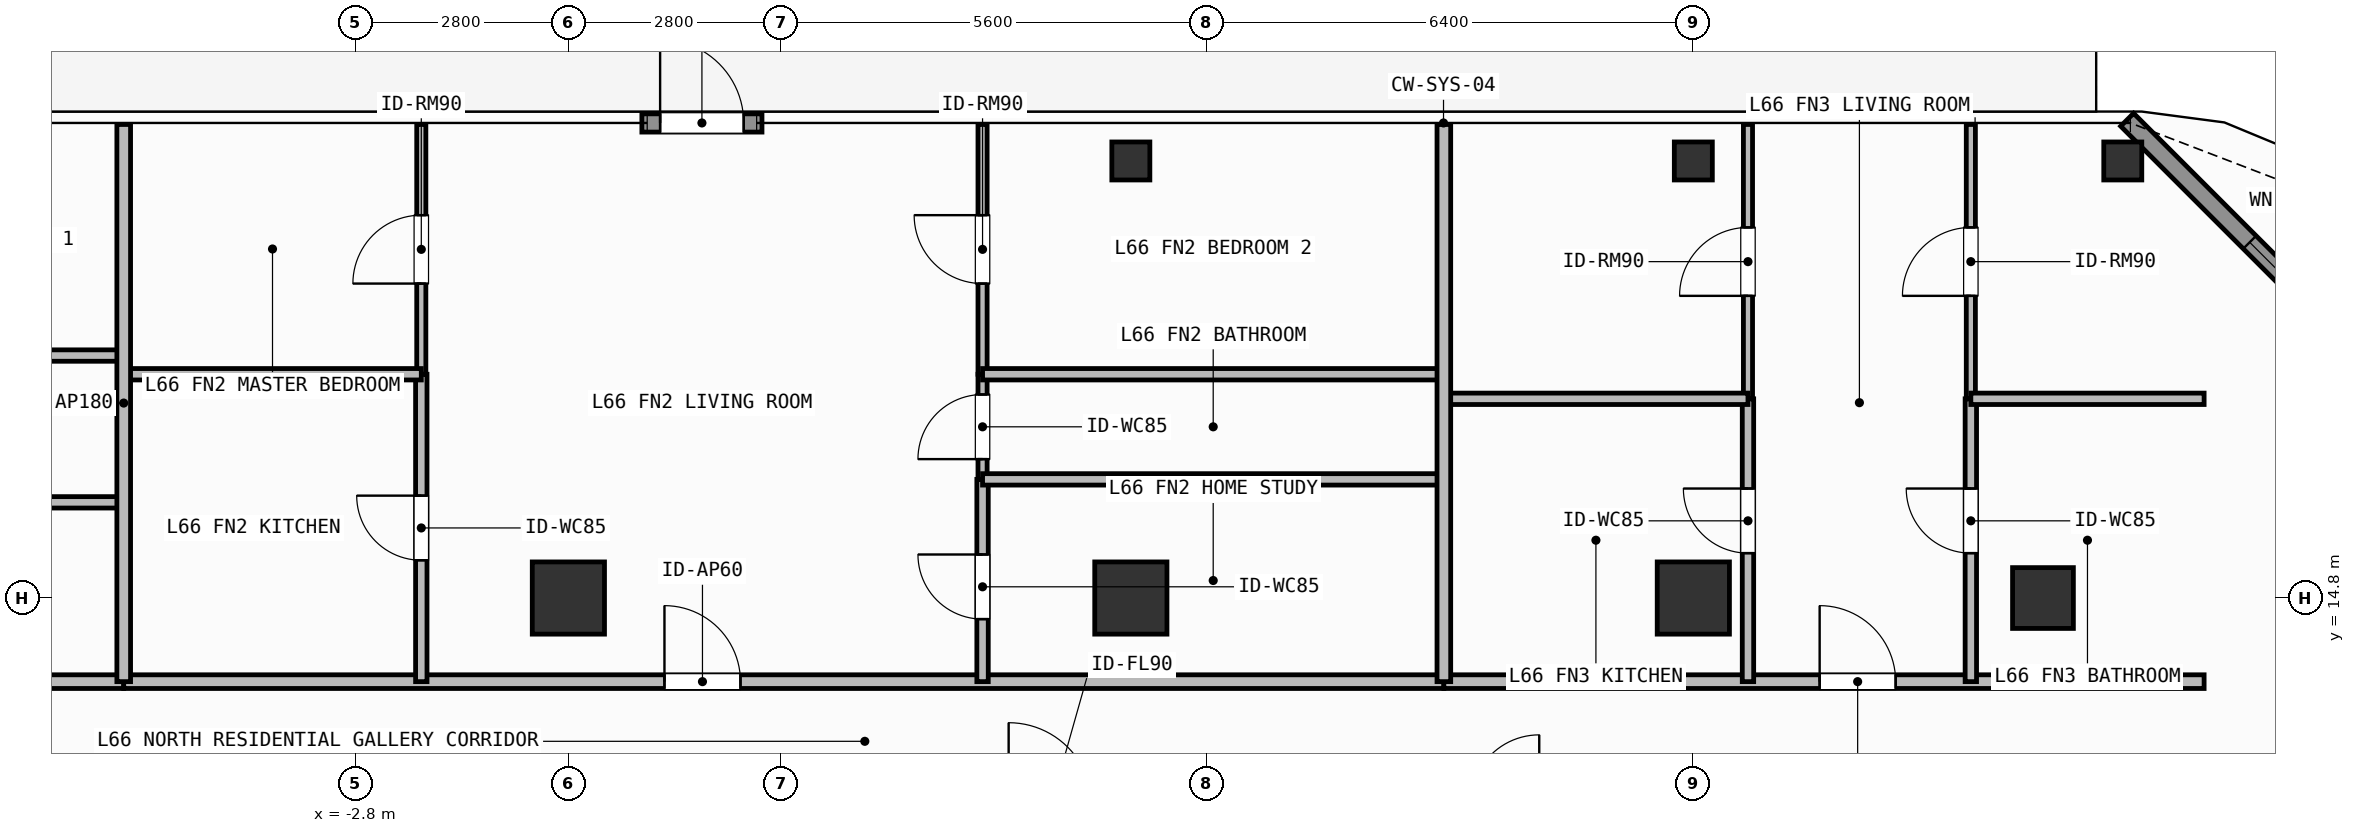
"""IFC4 building model, lengths in metres.
Left out: names, types, materials, properties, quantities, classifications, styles, units other than length and angle.
Written with IfcOpenShell. Run it as: python <this file> out.ifc"""

import sys

from ifc_helpers import new_model, si_unit, direction, frame, frame_2d, origin, origin_2d, place, context, subcontext, project, spatial, rectangle, hollow_rectangle, extrude, element, fill, save


model = new_model("IFC4")
c1 = context("Model", 3, precision=1e-05, world=origin(), true_north=direction((0.0, 1.0)))
c2 = subcontext(c1, "Body", "Model", "MODEL_VIEW")
j1 = project(units=[si_unit("LENGTHUNIT", "METRE"), si_unit("PLANEANGLEUNIT", "RADIAN")], contexts=[c1])
p1 = place(None, origin())
s1 = spatial("IfcSite", under=j1, at=p1, CompositionType="ELEMENT")
p2 = place(p1, origin())
s2 = spatial("IfcBuilding", under=s1, at=p2, CompositionType="ELEMENT")
p3 = place(p2, frame((0.0, 0.0, 270.3)))
s3 = spatial("IfcBuildingStorey", under=s2, at=p3, CompositionType="ELEMENT", Elevation=270.3)
for number, where, z_axis, x_axis in (
    (1, (0.0, 14.8, 0.0), (0.0, 0.0, 1.0), (1.0, 0.0, 0.0)),
    (2, (7.4, 14.8, 0.0), (0.0, 0.0, 1.0), (1.0, 0.0, 0.0)),
    (3, (14.8, 14.8, 0.0), (0.0, 0.0, 1.0), (1.0, 0.0, 0.0)),
):
    element("IfcColumn", number, at=place(p3, frame(where, z_axis=z_axis, x_axis=x_axis)), inside=s3, PredefinedType="COLUMN", context=c2, shape_type="SweptSolid", body=[
        extrude(rectangle(XDim=0.95, YDim=0.95, at=origin_2d()), origin(), (0.0, 0.0, 1.0), 3.9),
    ])
p4 = place(p3, frame((19.4, 14.8, 0.0), z_axis=(0.0, 0.0, 1.0), x_axis=(1.0, 0.0, 0.0)))
e4 = element("IfcColumn", 4, at=p4, inside=s3, PredefinedType="COLUMN", context=c2, shape_type="SweptSolid", body=[
    extrude(hollow_rectangle(XDim=0.8, YDim=0.8, WallThickness=0.036, at=origin_2d()), origin(), (0.0, 0.0, 1.0), 3.9),
])
for number, where, z_axis, x_axis in (
    (5, (20.45, 20.55, 0.0), (0.0, 0.0, 1.0), (1.0, 0.0, 0.0)),
    (6, (7.4, 20.55, 0.0), (0.0, 0.0, 1.0), (1.0, 0.0, 0.0)),
    (7, (14.8, 20.55, 0.0), (0.0, 0.0, 1.0), (1.0, 0.0, 0.0)),
):
    element("IfcColumn", number, at=place(p3, frame(where, z_axis=z_axis, x_axis=x_axis)), inside=s3, PredefinedType="COLUMN", context=c2, shape_type="SweptSolid", body=[
        extrude(hollow_rectangle(XDim=0.5, YDim=0.5, WallThickness=0.025, at=origin_2d()), origin(), (0.0, 0.0, 1.0), 3.9),
    ])
p5 = place(p3, frame((0.967, 21.05, 0.0), z_axis=(0.0, 0.0, 1.0), x_axis=(1.0, 0.0, 0.0)))
e8 = element("IfcWall", 8, at=p5, inside=s3, PredefinedType="SOLIDWALL", context=c2, shape_type="SweptSolid", body=[
    extrude(rectangle(XDim=1.58, YDim=0.24, at=frame_2d((0.79, 0.0))), origin(), (0.0, 0.0, 1.0), 3.68),
])
p6 = place(p5, frame((0.24, 0.0, 0.0)))
e9 = element("IfcOpeningElement", 9, at=p6, cuts=e8, PredefinedType="OPENING", context=c2, shape_type="SweptSolid", body=[
    extrude(rectangle(XDim=1.1, YDim=2.2, at=frame_2d((0.55, 1.1))), frame((0.0, 0.13, 0.0), z_axis=(0.0, -1.0, 0.0), x_axis=(1.0, 0.0, 0.0)), (0.0, 0.0, 1.0), 0.26),
])
p7 = place(p3, frame((20.508, 21.092, 0.0), z_axis=(0.0, 0.0, 1.0), x_axis=(0.707126925818, -0.707086635981, 0.0)))
e10 = element("IfcWall", 10, at=p7, inside=s3, PredefinedType="SOLIDWALL", context=c2, shape_type="SweptSolid", body=[
    extrude(rectangle(XDim=6.06, YDim=0.24, at=frame_2d((3.03, 0.0))), origin(), (0.0, 0.0, 1.0), 3.68),
])
p8 = place(p7, frame((2.28, 0.0, 0.8)))
e11 = element("IfcOpeningElement", 11, at=p8, cuts=e10, PredefinedType="OPENING", context=c2, shape_type="SweptSolid", body=[
    extrude(rectangle(XDim=1.5, YDim=1.85, at=frame_2d((0.75, 0.925))), frame((0.0, 0.13, 0.0), z_axis=(0.0, -1.0, 0.0), x_axis=(1.0, 0.0, 0.0)), (0.0, 0.0, 1.0), 0.26),
])
p9 = place(p3, frame((-13.72, 13.7, 0.0), z_axis=(0.0, 0.0, 1.0), x_axis=(1.0, 0.0, 0.0)))
e12 = element("IfcWall", 12, at=p9, inside=s3, PredefinedType="PARTITIONING", context=c2, shape_type="SweptSolid", body=[
    extrude(rectangle(XDim=7.87, YDim=0.18, at=frame_2d((3.935, 0.0))), origin(), (0.0, 0.0, 1.0), 3.68),
])
p10 = place(p9, frame((1.576, 0.0, 0.0)))
e13 = element("IfcOpeningElement", 13, at=p10, cuts=e12, PredefinedType="OPENING", context=c2, shape_type="SweptSolid", body=[
    extrude(rectangle(XDim=1.0, YDim=2.2, at=frame_2d((0.5, 1.1))), frame((0.0, 0.1, 0.0), z_axis=(0.0, -1.0, 0.0), x_axis=(1.0, 0.0, 0.0)), (0.0, 0.0, 1.0), 0.2),
])
p11 = place(p3, frame((-5.85, 13.7, 0.0), z_axis=(0.0, 0.0, 1.0), x_axis=(1.0, 0.0, 0.0)))
e14 = element("IfcWall", 14, at=p11, inside=s3, PredefinedType="PARTITIONING", context=c2, shape_type="SweptSolid", body=[
    extrude(rectangle(XDim=17.368, YDim=0.18, at=frame_2d((8.684, 0.0))), origin(), (0.0, 0.0, 1.0), 3.68),
])
p12 = place(p11, frame((7.114, 0.0, 0.0)))
e15 = element("IfcOpeningElement", 15, at=p12, cuts=e14, PredefinedType="OPENING", context=c2, shape_type="SweptSolid", body=[
    extrude(rectangle(XDim=1.0, YDim=2.2, at=frame_2d((0.5, 1.1))), frame((0.0, 0.1, 0.0), z_axis=(0.0, -1.0, 0.0), x_axis=(1.0, 0.0, 0.0)), (0.0, 0.0, 1.0), 0.2),
])
p13 = place(p3, frame((-1.935, 13.7, 0.0), z_axis=(0.0, 0.0, 1.0), x_axis=(0.0, 1.0, 0.0)))
e16 = element("IfcWall", 16, at=p13, inside=s3, PredefinedType="PARTITIONING", context=c2, shape_type="SweptSolid", body=[
    extrude(rectangle(XDim=4.044, YDim=0.15, at=frame_2d((2.022, 0.0))), origin(), (0.0, 0.0, 1.0), 3.68),
])
p14 = place(p13, frame((1.597, 0.0, 0.0)))
e17 = element("IfcOpeningElement", 17, at=p14, cuts=e16, PredefinedType="OPENING", context=c2, shape_type="SweptSolid", body=[
    extrude(rectangle(XDim=0.85, YDim=2.1, at=frame_2d((0.425, 1.05))), frame((0.0, 0.085, 0.0), z_axis=(0.0, -1.0, 0.0), x_axis=(1.0, 0.0, 0.0)), (0.0, 0.0, 1.0), 0.17),
])
p15 = place(p3, frame((-1.935, 17.744, 0.0), z_axis=(0.0, 0.0, 1.0), x_axis=(0.0, 1.0, 0.0)))
e18 = element("IfcWall", 18, at=p15, inside=s3, PredefinedType="PARTITIONING", context=c2, shape_type="SweptSolid", body=[
    extrude(rectangle(XDim=3.286, YDim=0.12, at=frame_2d((1.643, 0.0))), origin(), (0.0, 0.0, 1.0), 3.68),
])
p16 = place(p15, frame((1.193, 0.0, 0.0)))
e19 = element("IfcOpeningElement", 19, at=p16, cuts=e18, PredefinedType="OPENING", context=c2, shape_type="SweptSolid", body=[
    extrude(rectangle(XDim=0.9, YDim=2.1, at=frame_2d((0.45, 1.05))), frame((0.0, 0.07, 0.0), z_axis=(0.0, -1.0, 0.0), x_axis=(1.0, 0.0, 0.0)), (0.0, 0.0, 1.0), 0.14),
])
p17 = place(p3, frame((5.449, 13.7, 0.0), z_axis=(0.0, 0.0, 1.0), x_axis=(0.0, 1.0, 0.0)))
e20 = element("IfcWall", 20, at=p17, inside=s3, PredefinedType="PARTITIONING", context=c2, shape_type="SweptSolid", body=[
    extrude(rectangle(XDim=2.661, YDim=0.15, at=frame_2d((1.331, 0.0))), origin(), (0.0, 0.0, 1.0), 3.68),
])
p18 = place(p17, frame((0.823, 0.0, 0.0)))
e21 = element("IfcOpeningElement", 21, at=p18, cuts=e20, PredefinedType="OPENING", context=c2, shape_type="SweptSolid", body=[
    extrude(rectangle(XDim=0.85, YDim=2.1, at=frame_2d((0.425, 1.05))), frame((0.0, 0.085, 0.0), z_axis=(0.0, -1.0, 0.0), x_axis=(1.0, 0.0, 0.0)), (0.0, 0.0, 1.0), 0.17),
])
p19 = place(p3, frame((5.449, 16.361, 0.0), z_axis=(0.0, 0.0, 1.0), x_axis=(0.0, 1.0, 0.0)))
e22 = element("IfcWall", 22, at=p19, inside=s3, PredefinedType="PARTITIONING", context=c2, shape_type="SweptSolid", body=[
    extrude(rectangle(XDim=1.383, YDim=0.12, at=frame_2d((0.691, 0.0))), origin(), (0.0, 0.0, 1.0), 3.68),
])
p20 = place(p19, frame((0.267, 0.0, 0.0)))
e23 = element("IfcOpeningElement", 23, at=p20, cuts=e22, PredefinedType="OPENING", context=c2, shape_type="SweptSolid", body=[
    extrude(rectangle(XDim=0.85, YDim=2.1, at=frame_2d((0.425, 1.05))), frame((0.0, 0.07, 0.0), z_axis=(0.0, -1.0, 0.0), x_axis=(1.0, 0.0, 0.0)), (0.0, 0.0, 1.0), 0.14),
])
p21 = place(p3, frame((5.449, 17.744, 0.0), z_axis=(0.0, 0.0, 1.0), x_axis=(0.0, 1.0, 0.0)))
e24 = element("IfcWall", 24, at=p21, inside=s3, PredefinedType="PARTITIONING", context=c2, shape_type="SweptSolid", body=[
    extrude(rectangle(XDim=3.286, YDim=0.12, at=frame_2d((1.643, 0.0))), origin(), (0.0, 0.0, 1.0), 3.68),
])
p22 = place(p21, frame((1.193, 0.0, 0.0)))
e25 = element("IfcOpeningElement", 25, at=p22, cuts=e24, PredefinedType="OPENING", context=c2, shape_type="SweptSolid", body=[
    extrude(rectangle(XDim=0.9, YDim=2.1, at=frame_2d((0.45, 1.05))), frame((0.0, 0.07, 0.0), z_axis=(0.0, -1.0, 0.0), x_axis=(1.0, 0.0, 0.0)), (0.0, 0.0, 1.0), 0.14),
])
p23 = place(p3, frame((11.518, 13.7, 0.0), z_axis=(0.0, 0.0, 1.0), x_axis=(1.0, 0.0, 0.0)))
e26 = element("IfcWall", 26, at=p23, inside=s3, PredefinedType="PARTITIONING", context=c2, shape_type="SweptSolid", body=[
    extrude(rectangle(XDim=10.002, YDim=0.18, at=frame_2d((5.001, 0.0))), origin(), (0.0, 0.0, 1.0), 3.68),
])
p24 = place(p23, frame((4.944, 0.0, 0.0)))
e27 = element("IfcOpeningElement", 27, at=p24, cuts=e26, PredefinedType="OPENING", context=c2, shape_type="SweptSolid", body=[
    extrude(rectangle(XDim=1.0, YDim=2.2, at=frame_2d((0.5, 1.1))), frame((0.0, 0.1, 0.0), z_axis=(0.0, -1.0, 0.0), x_axis=(1.0, 0.0, 0.0)), (0.0, 0.0, 1.0), 0.2),
])
p25 = place(p3, frame((15.519, 13.7, 0.0), z_axis=(0.0, 0.0, 1.0), x_axis=(0.0, 1.0, 0.0)))
e28 = element("IfcWall", 28, at=p25, inside=s3, PredefinedType="PARTITIONING", context=c2, shape_type="SweptSolid", body=[
    extrude(rectangle(XDim=3.721, YDim=0.15, at=frame_2d((1.86, 0.0))), origin(), (0.0, 0.0, 1.0), 3.68),
])
p26 = place(p25, frame((1.691, 0.0, 0.0)))
e29 = element("IfcOpeningElement", 29, at=p26, cuts=e28, PredefinedType="OPENING", context=c2, shape_type="SweptSolid", body=[
    extrude(rectangle(XDim=0.85, YDim=2.1, at=frame_2d((0.425, 1.05))), frame((0.0, 0.085, 0.0), z_axis=(0.0, -1.0, 0.0), x_axis=(1.0, 0.0, 0.0)), (0.0, 0.0, 1.0), 0.17),
])
p27 = place(p3, frame((15.519, 17.421, 0.0), z_axis=(0.0, 0.0, 1.0), x_axis=(0.0, 1.0, 0.0)))
e30 = element("IfcWall", 30, at=p27, inside=s3, PredefinedType="PARTITIONING", context=c2, shape_type="SweptSolid", body=[
    extrude(rectangle(XDim=3.609, YDim=0.12, at=frame_2d((1.805, 0.0))), origin(), (0.0, 0.0, 1.0), 3.68),
])
p28 = place(p27, frame((1.354, 0.0, 0.0)))
e31 = element("IfcOpeningElement", 31, at=p28, cuts=e30, PredefinedType="OPENING", context=c2, shape_type="SweptSolid", body=[
    extrude(rectangle(XDim=0.9, YDim=2.1, at=frame_2d((0.45, 1.05))), frame((0.0, 0.07, 0.0), z_axis=(0.0, -1.0, 0.0), x_axis=(1.0, 0.0, 0.0)), (0.0, 0.0, 1.0), 0.14),
])
p29 = place(p3, frame((18.451, 13.7, 0.0), z_axis=(0.0, 0.0, 1.0), x_axis=(0.0, 1.0, 0.0)))
e32 = element("IfcWall", 32, at=p29, inside=s3, PredefinedType="PARTITIONING", context=c2, shape_type="SweptSolid", body=[
    extrude(rectangle(XDim=3.721, YDim=0.15, at=frame_2d((1.86, 0.0))), origin(), (0.0, 0.0, 1.0), 3.68),
])
p30 = place(p29, frame((1.691, 0.0, 0.0)))
e33 = element("IfcOpeningElement", 33, at=p30, cuts=e32, PredefinedType="OPENING", context=c2, shape_type="SweptSolid", body=[
    extrude(rectangle(XDim=0.85, YDim=2.1, at=frame_2d((0.425, 1.05))), frame((0.0, 0.085, 0.0), z_axis=(0.0, -1.0, 0.0), x_axis=(1.0, 0.0, 0.0)), (0.0, 0.0, 1.0), 0.17),
])
p31 = place(p3, frame((18.451, 17.421, 0.0), z_axis=(0.0, 0.0, 1.0), x_axis=(0.0, 1.0, 0.0)))
e34 = element("IfcWall", 34, at=p31, inside=s3, PredefinedType="PARTITIONING", context=c2, shape_type="SweptSolid", body=[
    extrude(rectangle(XDim=3.609, YDim=0.12, at=frame_2d((1.805, 0.0))), origin(), (0.0, 0.0, 1.0), 3.68),
])
p32 = place(p31, frame((1.354, 0.0, 0.0)))
e35 = element("IfcOpeningElement", 35, at=p32, cuts=e34, PredefinedType="OPENING", context=c2, shape_type="SweptSolid", body=[
    extrude(rectangle(XDim=0.9, YDim=2.1, at=frame_2d((0.45, 1.05))), frame((0.0, 0.07, 0.0), z_axis=(0.0, -1.0, 0.0), x_axis=(1.0, 0.0, 0.0)), (0.0, 0.0, 1.0), 0.14),
])
for number, where, z_axis, x_axis in (
    (36, (-10.257, 16.059, 0.0), (0.0, 0.0, 1.0), (1.0, 0.0, 0.0)),
    (37, (-10.257, 17.99, 0.0), (0.0, 0.0, 1.0), (1.0, 0.0, 0.0)),
):
    element("IfcWall", number, at=place(p3, frame(where, z_axis=z_axis, x_axis=x_axis)), inside=s3, PredefinedType="PARTITIONING", context=c2, shape_type="SweptSolid", body=[
        extrude(rectangle(XDim=4.407, YDim=0.15, at=frame_2d((2.204, 0.0))), origin(), (0.0, 0.0, 1.0), 3.68),
    ])
p33 = place(p3, frame((-5.85, 17.744, 0.0), z_axis=(0.0, 0.0, 1.0), x_axis=(1.0, 0.0, 0.0)))
e38 = element("IfcWall", 38, at=p33, inside=s3, PredefinedType="PARTITIONING", context=c2, shape_type="SweptSolid", body=[
    extrude(rectangle(XDim=3.915, YDim=0.15, at=frame_2d((1.958, 0.0))), origin(), (0.0, 0.0, 1.0), 3.68),
])
for number, where, z_axis, x_axis in (
    (39, (5.449, 16.361, 0.0), (0.0, 0.0, 1.0), (1.0, 0.0, 0.0)),
    (40, (5.449, 17.744, 0.0), (0.0, 0.0, 1.0), (1.0, 0.0, 0.0)),
):
    element("IfcWall", number, at=place(p3, frame(where, z_axis=z_axis, x_axis=x_axis)), inside=s3, PredefinedType="PARTITIONING", context=c2, shape_type="SweptSolid", body=[
        extrude(rectangle(XDim=6.069, YDim=0.15, at=frame_2d((3.035, 0.0))), origin(), (0.0, 0.0, 1.0), 3.68),
    ])
p34 = place(p3, frame((-5.85, 13.7, 0.0), z_axis=(0.0, 0.0, 1.0), x_axis=(0.0, 1.0, 0.0)))
e41 = element("IfcWall", 41, at=p34, inside=s3, PredefinedType="PARTITIONING", context=c2, shape_type="SweptSolid", body=[
    extrude(rectangle(XDim=7.33, YDim=0.18, at=frame_2d((3.665, 0.0))), origin(), (0.0, 0.0, 1.0), 3.68),
])
p35 = place(p3, frame((11.518, 17.421, 0.0), z_axis=(0.0, 0.0, 1.0), x_axis=(1.0, 0.0, 0.0)))
e42 = element("IfcWall", 42, at=p35, inside=s3, PredefinedType="PARTITIONING", context=c2, shape_type="SweptSolid", body=[
    extrude(rectangle(XDim=4.001, YDim=0.15, at=frame_2d((2.0, 0.0))), origin(), (0.0, 0.0, 1.0), 3.68),
])
p36 = place(p3, frame((18.451, 17.421, 0.0), z_axis=(0.0, 0.0, 1.0), x_axis=(1.0, 0.0, 0.0)))
e43 = element("IfcWall", 43, at=p36, inside=s3, PredefinedType="PARTITIONING", context=c2, shape_type="SweptSolid", body=[
    extrude(rectangle(XDim=3.069, YDim=0.15, at=frame_2d((1.535, 0.0))), origin(), (0.0, 0.0, 1.0), 3.68),
])
p37 = place(p3, frame((11.518, 13.7, 0.0), z_axis=(0.0, 0.0, 1.0), x_axis=(0.0, 1.0, 0.0)))
e44 = element("IfcWall", 44, at=p37, inside=s3, PredefinedType="PARTITIONING", context=c2, shape_type="SweptSolid", body=[
    extrude(rectangle(XDim=7.33, YDim=0.18, at=frame_2d((3.665, 0.0))), origin(), (0.0, 0.0, 1.0), 3.68),
])
p38 = place(p6, origin())
e45 = element("IfcDoor", 45, at=p38, inside=s3, OperationType="SINGLE_SWING_LEFT", PredefinedType="DOOR", context=c2, shape_type="SweptSolid", body=[
    extrude(rectangle(XDim=1.1, YDim=2.2, at=frame_2d((0.55, 1.1))), frame((0.0, 0.025, 0.0), z_axis=(0.0, -1.0, 0.0), x_axis=(1.0, 0.0, 0.0)), (0.0, 0.0, 1.0), 0.05),
])
fill(e9, e45)
p39 = place(p8, origin())
e46 = element("IfcWindow", 46, at=p39, inside=s3, PartitioningType="SINGLE_PANEL", PredefinedType="WINDOW", context=c2, shape_type="SweptSolid", body=[
    extrude(rectangle(XDim=1.5, YDim=1.85, at=frame_2d((0.75, 0.925))), frame((0.0, 0.03, 0.0), z_axis=(0.0, -1.0, 0.0), x_axis=(1.0, 0.0, 0.0)), (0.0, 0.0, 1.0), 0.06),
])
fill(e11, e46)
p40 = place(p12, origin())
e47 = element("IfcDoor", 47, at=p40, inside=s3, OperationType="SINGLE_SWING_LEFT", PredefinedType="DOOR", context=c2, shape_type="SweptSolid", body=[
    extrude(rectangle(XDim=1.0, YDim=2.2, at=frame_2d((0.5, 1.1))), frame((0.0, 0.025, 0.0), z_axis=(0.0, -1.0, 0.0), x_axis=(1.0, 0.0, 0.0)), (0.0, 0.0, 1.0), 0.05),
])
fill(e15, e47)
p41 = place(p14, origin())
e48 = element("IfcDoor", 48, at=p41, inside=s3, OperationType="SINGLE_SWING_RIGHT", PredefinedType="DOOR", context=c2, shape_type="SweptSolid", body=[
    extrude(rectangle(XDim=0.85, YDim=2.1, at=frame_2d((0.425, 1.05))), frame((0.0, 0.025, 0.0), z_axis=(0.0, -1.0, 0.0), x_axis=(1.0, 0.0, 0.0)), (0.0, 0.0, 1.0), 0.05),
])
fill(e17, e48)
p42 = place(p16, origin())
e49 = element("IfcDoor", 49, at=p42, inside=s3, OperationType="SINGLE_SWING_LEFT", PredefinedType="DOOR", context=c2, shape_type="SweptSolid", body=[
    extrude(rectangle(XDim=0.9, YDim=2.1, at=frame_2d((0.45, 1.05))), frame((0.0, 0.025, 0.0), z_axis=(0.0, -1.0, 0.0), x_axis=(1.0, 0.0, 0.0)), (0.0, 0.0, 1.0), 0.05),
])
fill(e19, e49)
p43 = place(p18, origin())
e50 = element("IfcDoor", 50, at=p43, inside=s3, OperationType="SINGLE_SWING_RIGHT", PredefinedType="DOOR", context=c2, shape_type="SweptSolid", body=[
    extrude(rectangle(XDim=0.85, YDim=2.1, at=frame_2d((0.425, 1.05))), frame((0.0, 0.025, 0.0), z_axis=(0.0, -1.0, 0.0), x_axis=(1.0, 0.0, 0.0)), (0.0, 0.0, 1.0), 0.05),
])
fill(e21, e50)
p44 = place(p20, origin())
e51 = element("IfcDoor", 51, at=p44, inside=s3, OperationType="SINGLE_SWING_LEFT", PredefinedType="DOOR", context=c2, shape_type="SweptSolid", body=[
    extrude(rectangle(XDim=0.85, YDim=2.1, at=frame_2d((0.425, 1.05))), frame((0.0, 0.025, 0.0), z_axis=(0.0, -1.0, 0.0), x_axis=(1.0, 0.0, 0.0)), (0.0, 0.0, 1.0), 0.05),
])
fill(e23, e51)
p45 = place(p22, origin())
e52 = element("IfcDoor", 52, at=p45, inside=s3, OperationType="SINGLE_SWING_RIGHT", PredefinedType="DOOR", context=c2, shape_type="SweptSolid", body=[
    extrude(rectangle(XDim=0.9, YDim=2.1, at=frame_2d((0.45, 1.05))), frame((0.0, 0.025, 0.0), z_axis=(0.0, -1.0, 0.0), x_axis=(1.0, 0.0, 0.0)), (0.0, 0.0, 1.0), 0.05),
])
fill(e25, e52)
p46 = place(p24, origin())
e53 = element("IfcDoor", 53, at=p46, inside=s3, OperationType="SINGLE_SWING_LEFT", PredefinedType="DOOR", context=c2, shape_type="SweptSolid", body=[
    extrude(rectangle(XDim=1.0, YDim=2.2, at=frame_2d((0.5, 1.1))), frame((0.0, 0.025, 0.0), z_axis=(0.0, -1.0, 0.0), x_axis=(1.0, 0.0, 0.0)), (0.0, 0.0, 1.0), 0.05),
])
fill(e27, e53)
p47 = place(p26, origin())
e54 = element("IfcDoor", 54, at=p47, inside=s3, OperationType="SINGLE_SWING_RIGHT", PredefinedType="DOOR", context=c2, shape_type="SweptSolid", body=[
    extrude(rectangle(XDim=0.85, YDim=2.1, at=frame_2d((0.425, 1.05))), frame((0.0, 0.025, 0.0), z_axis=(0.0, -1.0, 0.0), x_axis=(1.0, 0.0, 0.0)), (0.0, 0.0, 1.0), 0.05),
])
fill(e29, e54)
p48 = place(p28, origin())
e55 = element("IfcDoor", 55, at=p48, inside=s3, OperationType="SINGLE_SWING_LEFT", PredefinedType="DOOR", context=c2, shape_type="SweptSolid", body=[
    extrude(rectangle(XDim=0.9, YDim=2.1, at=frame_2d((0.45, 1.05))), frame((0.0, 0.025, 0.0), z_axis=(0.0, -1.0, 0.0), x_axis=(1.0, 0.0, 0.0)), (0.0, 0.0, 1.0), 0.05),
])
fill(e31, e55)
p49 = place(p30, origin())
e56 = element("IfcDoor", 56, at=p49, inside=s3, OperationType="SINGLE_SWING_RIGHT", PredefinedType="DOOR", context=c2, shape_type="SweptSolid", body=[
    extrude(rectangle(XDim=0.85, YDim=2.1, at=frame_2d((0.425, 1.05))), frame((0.0, 0.025, 0.0), z_axis=(0.0, -1.0, 0.0), x_axis=(1.0, 0.0, 0.0)), (0.0, 0.0, 1.0), 0.05),
])
fill(e33, e56)
p50 = place(p32, origin())
e57 = element("IfcDoor", 57, at=p50, inside=s3, OperationType="SINGLE_SWING_LEFT", PredefinedType="DOOR", context=c2, shape_type="SweptSolid", body=[
    extrude(rectangle(XDim=0.9, YDim=2.1, at=frame_2d((0.45, 1.05))), frame((0.0, 0.025, 0.0), z_axis=(0.0, -1.0, 0.0), x_axis=(1.0, 0.0, 0.0)), (0.0, 0.0, 1.0), 0.05),
])
fill(e35, e57)
save(model, sys.argv[1])
